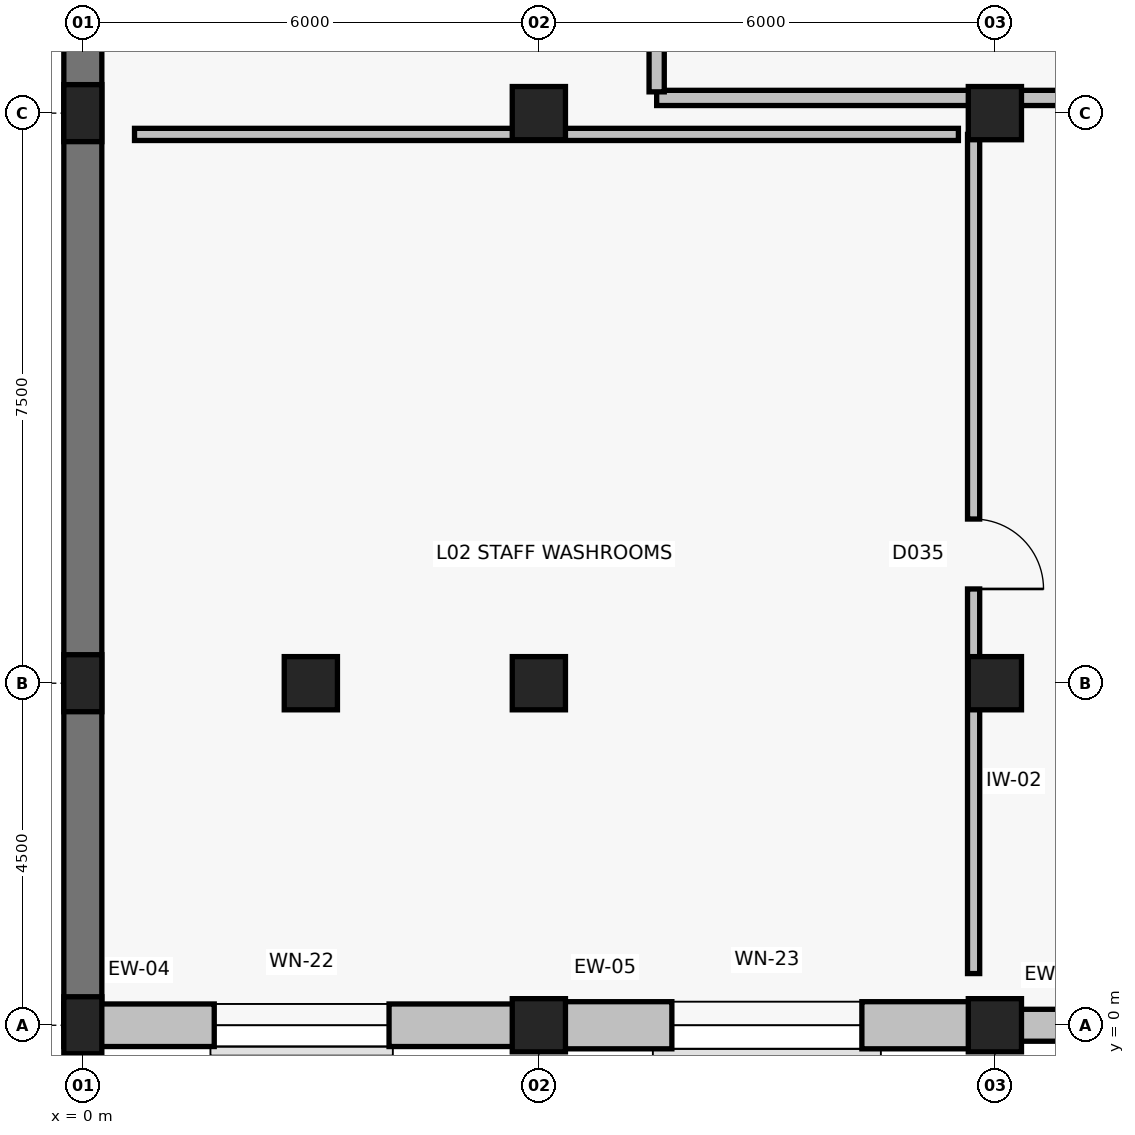
"""IFC4 building model, lengths in metres.
Left out: names, types, materials, properties, quantities, classifications, styles, units other than length and angle.
Written with IfcOpenShell. Run it as: python <this file> out.ifc"""

import sys

from ifc_helpers import new_model, si_unit, direction, frame, frame_2d, origin, origin_2d, place, context, subcontext, project, spatial, rectangle, extrude, element, fill, save


model = new_model("IFC4")
c1 = context("Model", 3, precision=1e-05, world=origin(), true_north=direction((0.0, 1.0)))
c2 = subcontext(c1, "Body", "Model", "MODEL_VIEW")
j1 = project(units=[si_unit("LENGTHUNIT", "METRE"), si_unit("PLANEANGLEUNIT", "RADIAN")], contexts=[c1])
p1 = place(None, origin())
s1 = spatial("IfcSite", under=j1, at=p1, CompositionType="ELEMENT")
p2 = place(p1, origin())
s2 = spatial("IfcBuilding", under=s1, at=p2, CompositionType="ELEMENT")
p3 = place(p2, frame((0.0, 0.0, 6.6)))
s3 = spatial("IfcBuildingStorey", under=s2, at=p3, CompositionType="ELEMENT", Elevation=6.6)
for number, where, z_axis, x_axis in (
    (1, (0.0, 0.0, 0.0), (0.0, 0.0, 1.0), (1.0, 0.0, 0.0)),
    (2, (0.0, 4.5, 0.0), (0.0, 0.0, 1.0), (1.0, 0.0, 0.0)),
    (3, (0.0, 12.0, 0.0), (0.0, 0.0, 1.0), (1.0, 0.0, 0.0)),
):
    element("IfcColumn", number, at=place(p3, frame(where, z_axis=z_axis, x_axis=x_axis)), inside=s3, PredefinedType="PILASTER", context=c2, shape_type="SweptSolid", body=[
        extrude(rectangle(XDim=0.5, YDim=0.75, at=origin_2d()), origin(), (0.0, 0.0, 1.0), 4.8),
    ])
for number, where, z_axis, x_axis in (
    (4, (3.0, 4.5, 0.0), (0.0, 0.0, 1.0), (1.0, 0.0, 0.0)),
    (5, (6.0, 0.0, 0.0), (0.0, 0.0, 1.0), (1.0, 0.0, 0.0)),
    (6, (6.0, 4.5, 0.0), (0.0, 0.0, 1.0), (1.0, 0.0, 0.0)),
    (7, (6.0, 12.0, 0.0), (0.0, 0.0, 1.0), (1.0, 0.0, 0.0)),
    (8, (12.0, 0.0, 0.0), (0.0, 0.0, 1.0), (1.0, 0.0, 0.0)),
    (9, (12.0, 4.5, 0.0), (0.0, 0.0, 1.0), (1.0, 0.0, 0.0)),
    (10, (12.0, 12.0, 0.0), (0.0, 0.0, 1.0), (1.0, 0.0, 0.0)),
):
    element("IfcColumn", number, at=place(p3, frame(where, z_axis=z_axis, x_axis=x_axis)), inside=s3, PredefinedType="COLUMN", context=c2, shape_type="SweptSolid", body=[
        extrude(rectangle(XDim=0.7, YDim=0.7, at=origin_2d()), origin(), (0.0, 0.0, 1.0), 4.8),
    ])
p4 = place(p3, frame((0.0, -0.008, 0.0), z_axis=(0.0, 0.0, 1.0), x_axis=(0.0, 1.0, 0.0)))
e11 = element("IfcWall", 11, at=p4, inside=s3, PredefinedType="SOLIDWALL", context=c2, shape_type="SweptSolid", body=[
    extrude(rectangle(XDim=96.016, YDim=0.5, at=frame_2d((48.008, 0.0))), origin(), (0.0, 0.0, 1.0), 4.48),
])
p5 = place(p3, frame((-0.25, 0.0, 0.0), z_axis=(0.0, 0.0, 1.0), x_axis=(1.0, 0.0, 0.0)))
e12 = element("IfcWall", 12, at=p5, inside=s3, PredefinedType="SOLIDWALL", context=c2, shape_type="SweptSolid", body=[
    extrude(rectangle(XDim=6.258, YDim=0.56, at=frame_2d((3.129, 0.0))), origin(), (0.0, 0.0, 1.0), 3.911),
])
p6 = place(p5, frame((1.979, 0.0, 0.9)))
e13 = element("IfcOpeningElement", 13, at=p6, cuts=e12, PredefinedType="OPENING", context=c2, shape_type="SweptSolid", body=[
    extrude(rectangle(XDim=2.3, YDim=2.4, at=frame_2d((1.15, 1.2))), frame((0.0, 0.295, 0.0), z_axis=(0.0, -1.0, 0.0), x_axis=(1.0, 0.0, 0.0)), (0.0, 0.0, 1.0), 0.59),
])
p7 = place(p3, frame((5.992, 0.0, 0.0), z_axis=(0.0, 0.0, 1.0), x_axis=(1.0, 0.0, 0.0)))
e14 = element("IfcWall", 14, at=p7, inside=s3, PredefinedType="SOLIDWALL", context=c2, shape_type="SweptSolid", body=[
    extrude(rectangle(XDim=6.016, YDim=0.62, at=frame_2d((3.008, 0.0))), origin(), (0.0, 0.0, 1.0), 3.911),
])
p8 = place(p7, frame((1.758, 0.0, 0.9)))
e15 = element("IfcOpeningElement", 15, at=p8, cuts=e14, PredefinedType="OPENING", context=c2, shape_type="SweptSolid", body=[
    extrude(rectangle(XDim=2.5, YDim=2.4, at=frame_2d((1.25, 1.2))), frame((0.0, 0.325, 0.0), z_axis=(0.0, -1.0, 0.0), x_axis=(1.0, 0.0, 0.0)), (0.0, 0.0, 1.0), 0.65),
])
p9 = place(p3, frame((11.992, 0.0, 0.0), z_axis=(0.0, 0.0, 1.0), x_axis=(1.0, 0.0, 0.0)))
e16 = element("IfcWall", 16, at=p9, inside=s3, PredefinedType="SOLIDWALL", context=c2, shape_type="SweptSolid", body=[
    extrude(rectangle(XDim=6.016, YDim=0.42, at=frame_2d((3.008, 0.0))), origin(), (0.0, 0.0, 1.0), 3.911),
])
p10 = place(p9, frame((1.608, 0.0, 0.9)))
e17 = element("IfcOpeningElement", 17, at=p10, cuts=e16, PredefinedType="OPENING", context=c2, shape_type="SweptSolid", body=[
    extrude(rectangle(XDim=2.8, YDim=2.4, at=frame_2d((1.4, 1.2))), frame((0.0, 0.225, 0.0), z_axis=(0.0, -1.0, 0.0), x_axis=(1.0, 0.0, 0.0)), (0.0, 0.0, 1.0), 0.45),
])
p11 = place(p3, frame((7.55, 12.2, 0.0), z_axis=(0.0, 0.0, 1.0), x_axis=(1.0, 0.0, 0.0)))
e18 = element("IfcWall", 18, at=p11, inside=s3, PredefinedType="PARTITIONING", context=c2, shape_type="SweptSolid", body=[
    extrude(rectangle(XDim=7.75, YDim=0.2, at=frame_2d((3.875, 0.0))), origin(), (0.0, 0.0, 1.0), 3.911),
])
p12 = place(p3, frame((7.55, 15.6, 0.0), z_axis=(0.0, 0.0, 1.0), x_axis=(0.0, -1.0, 0.0)))
e19 = element("IfcWall", 19, at=p12, inside=s3, PredefinedType="PARTITIONING", context=c2, shape_type="SweptSolid", body=[
    extrude(rectangle(XDim=3.32, YDim=0.2, at=frame_2d((1.66, 0.0))), origin(), (0.0, 0.0, 1.0), 4.04),
])
p13 = place(p3, frame((11.72, 11.72, 0.0), z_axis=(0.0, 0.0, 1.0), x_axis=(0.0, -1.0, 0.0)))
e20 = element("IfcWall", 20, at=p13, inside=s3, PredefinedType="PARTITIONING", context=c2, shape_type="SweptSolid", body=[
    extrude(rectangle(XDim=11.04, YDim=0.16, at=frame_2d((5.52, 0.0))), origin(), (0.0, 0.0, 1.0), 3.911),
])
p14 = place(p13, frame((5.06, 0.0, 0.0)))
e21 = element("IfcOpeningElement", 21, at=p14, cuts=e20, PredefinedType="OPENING", context=c2, shape_type="SweptSolid", body=[
    extrude(rectangle(XDim=0.92, YDim=2.1, at=frame_2d((0.46, 1.05))), frame((0.0, 0.095, 0.0), z_axis=(0.0, -1.0, 0.0), x_axis=(1.0, 0.0, 0.0)), (0.0, 0.0, 1.0), 0.19),
])
p15 = place(p3, frame((0.68, 11.72, 0.0), z_axis=(0.0, 0.0, 1.0), x_axis=(1.0, 0.0, 0.0)))
e22 = element("IfcWall", 22, at=p15, inside=s3, PredefinedType="PARTITIONING", context=c2, shape_type="SweptSolid", body=[
    extrude(rectangle(XDim=10.84, YDim=0.16, at=frame_2d((5.42, 0.0))), origin(), (0.0, 0.0, 1.0), 3.987),
])
p16 = place(p6, origin())
e23 = element("IfcWindow", 23, at=p16, inside=s3, PartitioningType="SINGLE_PANEL", PredefinedType="WINDOW", context=c2, shape_type="SweptSolid", body=[
    extrude(rectangle(XDim=2.3, YDim=2.4, at=frame_2d((1.15, 1.2))), frame((0.0, 0.03, 0.0), z_axis=(0.0, -1.0, 0.0), x_axis=(1.0, 0.0, 0.0)), (0.0, 0.0, 1.0), 0.06),
])
fill(e13, e23)
p17 = place(p8, origin())
e24 = element("IfcWindow", 24, at=p17, inside=s3, PartitioningType="SINGLE_PANEL", PredefinedType="WINDOW", context=c2, shape_type="SweptSolid", body=[
    extrude(rectangle(XDim=2.5, YDim=2.4, at=frame_2d((1.25, 1.2))), frame((0.0, 0.03, 0.0), z_axis=(0.0, -1.0, 0.0), x_axis=(1.0, 0.0, 0.0)), (0.0, 0.0, 1.0), 0.06),
])
fill(e15, e24)
p18 = place(p14, origin())
e25 = element("IfcDoor", 25, at=p18, inside=s3, OperationType="SINGLE_SWING_RIGHT", PredefinedType="DOOR", context=c2, shape_type="SweptSolid", body=[
    extrude(rectangle(XDim=0.92, YDim=2.1, at=frame_2d((0.46, 1.05))), frame((0.0, 0.025, 0.0), z_axis=(0.0, -1.0, 0.0), x_axis=(1.0, 0.0, 0.0)), (0.0, 0.0, 1.0), 0.05),
])
fill(e21, e25)
save(model, sys.argv[1])
